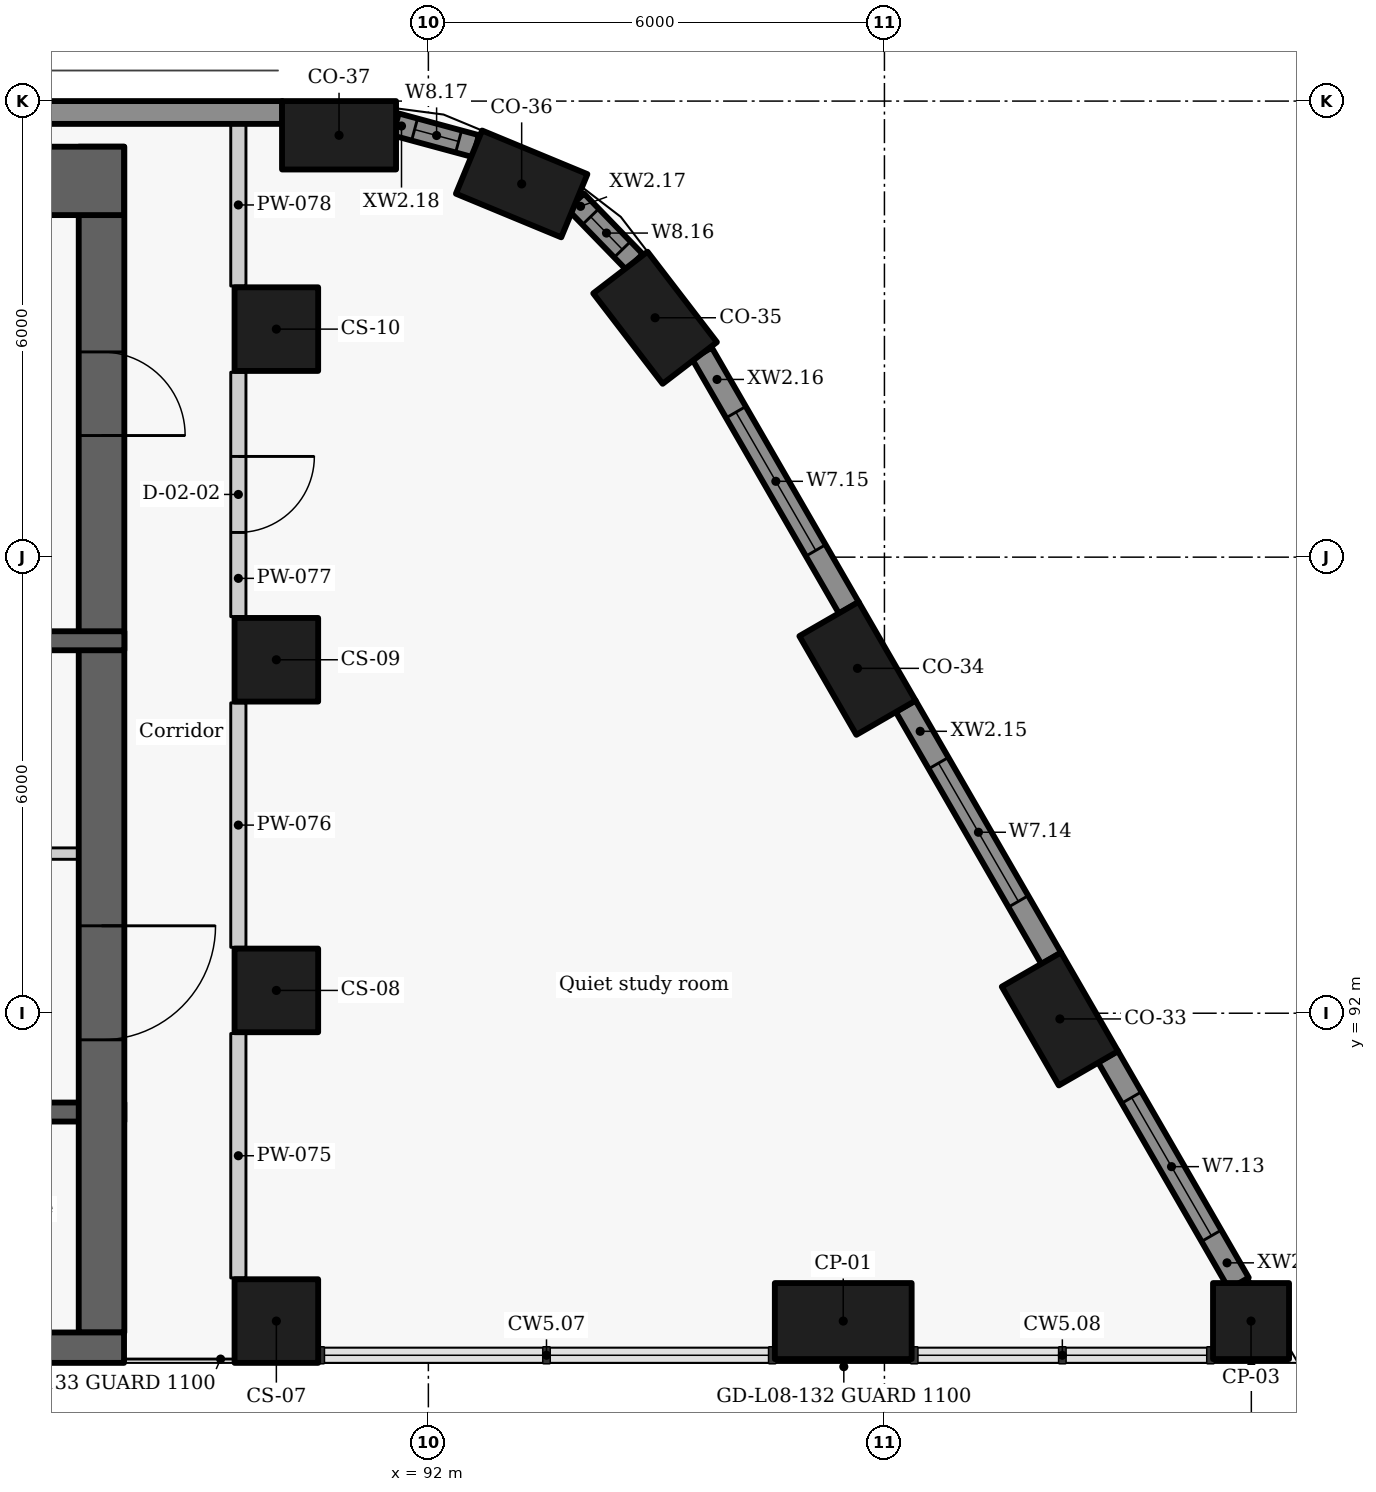
"""IFC4 building model, lengths in metres.
Left out: names, types, materials, properties, quantities, classifications, styles, units other than length and angle.
Written with IfcOpenShell. Run it as: python <this file> out.ifc"""

import sys

from ifc_helpers import new_model, si_unit, direction, frame, frame_2d, origin, origin_2d, place, context, subcontext, project, spatial, rectangle, extrude, element, fill, save


model = new_model("IFC4")
c1 = context("Model", 3, precision=1e-05, world=origin(), true_north=direction((0.0, 1.0)))
c2 = subcontext(c1, "Body", "Model", "MODEL_VIEW")
j1 = project(units=[si_unit("LENGTHUNIT", "METRE"), si_unit("PLANEANGLEUNIT", "RADIAN")], contexts=[c1])
p1 = place(None, origin())
s1 = spatial("IfcSite", under=j1, at=p1, CompositionType="ELEMENT")
p2 = place(p1, origin())
s2 = spatial("IfcBuilding", under=s1, at=p2, CompositionType="ELEMENT")
p3 = place(p2, frame((0.0, 0.0, 34.8)))
s3 = spatial("IfcBuildingStorey", under=s2, at=p3, CompositionType="ELEMENT", Elevation=34.8)
for number, where, z_axis, x_axis in (
    (1, (100.308, 91.925, 0.0), (0.0, 0.0, 1.0), (-0.5, 0.866, 0.0)),
    (2, (97.646, 96.537, 0.0), (0.0, 0.0, 1.0), (-0.5, 0.866, 0.0)),
    (3, (94.982, 101.149, 0.0), (0.0, 0.0, 1.0), (-0.609, 0.793, 0.0)),
    (4, (93.227, 102.91, 0.0), (0.0, 0.0, 1.0), (-0.924, 0.383, 0.0)),
    (5, (90.825, 103.55, 0.0), (0.0, 0.0, 1.0), (-1.0, 0.0, 0.0)),
):
    element("IfcColumn", number, at=place(p3, frame(where, z_axis=z_axis, x_axis=x_axis)), inside=s3, PredefinedType="COLUMN", context=c2, shape_type="SweptSolid", body=[
        extrude(rectangle(XDim=1.5, YDim=0.9, at=origin_2d()), origin(), (0.0, 0.0, 1.0), 3.3),
    ])
for number, where, z_axis, x_axis in (
    (6, (90.0, 87.95, 0.0), (0.0, 0.0, 1.0), (0.0, 1.0, 0.0)),
    (7, (90.0, 92.3, 0.0), (0.0, 0.0, 1.0), (0.0, 1.0, 0.0)),
    (8, (90.0, 96.65, 0.0), (0.0, 0.0, 1.0), (0.0, 1.0, 0.0)),
    (9, (90.0, 101.0, 0.0), (0.0, 0.0, 1.0), (0.0, 1.0, 0.0)),
):
    element("IfcColumn", number, at=place(p3, frame(where, z_axis=z_axis, x_axis=x_axis)), inside=s3, PredefinedType="COLUMN", context=c2, shape_type="SweptSolid", body=[
        extrude(rectangle(XDim=1.1, YDim=1.1, at=origin_2d()), origin(), (0.0, 0.0, 1.0), 3.3),
    ])
p4 = place(p3, frame((97.458, 87.95, 0.0), z_axis=(0.0, 0.0, 1.0), x_axis=(1.0, 0.0, 0.0)))
e10 = element("IfcColumn", 10, at=p4, inside=s3, PredefinedType="COLUMN", context=c2, shape_type="SweptSolid", body=[
    extrude(rectangle(XDim=1.8, YDim=1.0, at=origin_2d()), origin(), (0.0, 0.0, 1.0), 3.3),
])
p5 = place(p3, frame((102.823, 87.95, 0.0), z_axis=(0.0, 0.0, 1.0), x_axis=(1.0, 0.0, 0.0)))
e11 = element("IfcColumn", 11, at=p5, inside=s3, PredefinedType="COLUMN", context=c2, shape_type="SweptSolid", body=[
    extrude(rectangle(XDim=1.0, YDim=1.0, at=origin_2d()), origin(), (0.0, 0.0, 1.0), 3.3),
])
p6 = place(p3, frame((102.663, 88.447, 0.0), z_axis=(0.0, 0.0, 1.0), x_axis=(-0.500035437112, 0.866004943191, 0.0)))
e12 = element("IfcWall", 12, at=p6, inside=s3, PredefinedType="SOLIDWALL", context=c2, shape_type="SweptSolid", body=[
    extrude(rectangle(XDim=3.444, YDim=0.3, at=frame_2d((1.722, 0.0))), origin(), (0.0, 0.0, 1.0), 2.3),
])
p7 = place(p6, frame((0.722, 0.0, 0.9)))
e13 = element("IfcOpeningElement", 13, at=p7, cuts=e12, PredefinedType="OPENING", context=c2, shape_type="SweptSolid", body=[
    extrude(rectangle(XDim=2.1, YDim=1.1, at=frame_2d((1.05, 0.55))), frame((0.0, 0.16, 0.0), z_axis=(0.0, -1.0, 0.0), x_axis=(1.0, 0.0, 0.0)), (0.0, 0.0, 1.0), 0.32),
])
p8 = place(p3, frame((100.195, 92.721, 0.0), z_axis=(0.0, 0.0, 1.0), x_axis=(-0.500001735503, 0.866024401789, 0.0)))
e14 = element("IfcWall", 14, at=p8, inside=s3, PredefinedType="SOLIDWALL", context=c2, shape_type="SweptSolid", body=[
    extrude(rectangle(XDim=3.834, YDim=0.3, at=frame_2d((1.917, 0.0))), origin(), (0.0, 0.0, 1.0), 2.3),
])
p9 = place(p8, frame((0.867, 0.0, 0.9)))
e15 = element("IfcOpeningElement", 15, at=p9, cuts=e14, PredefinedType="OPENING", context=c2, shape_type="SweptSolid", body=[
    extrude(rectangle(XDim=2.1, YDim=1.1, at=frame_2d((1.05, 0.55))), frame((0.0, 0.16, 0.0), z_axis=(0.0, -1.0, 0.0), x_axis=(1.0, 0.0, 0.0)), (0.0, 0.0, 1.0), 0.32),
])
p10 = place(p3, frame((97.532, 97.333, 0.0), z_axis=(0.0, 0.0, 1.0), x_axis=(-0.499948341072, 0.866055227026, 0.0)))
e16 = element("IfcWall", 16, at=p10, inside=s3, PredefinedType="SOLIDWALL", context=c2, shape_type="SweptSolid", body=[
    extrude(rectangle(XDim=3.867, YDim=0.3, at=frame_2d((1.934, 0.0))), origin(), (0.0, 0.0, 1.0), 2.3),
])
p11 = place(p10, frame((0.872, 0.0, 0.9)))
e17 = element("IfcOpeningElement", 17, at=p11, cuts=e16, PredefinedType="OPENING", context=c2, shape_type="SweptSolid", body=[
    extrude(rectangle(XDim=2.1, YDim=1.1, at=frame_2d((1.05, 0.55))), frame((0.0, 0.16, 0.0), z_axis=(0.0, -1.0, 0.0), x_axis=(1.0, 0.0, 0.0)), (0.0, 0.0, 1.0), 0.32),
])
p12 = place(p3, frame((94.713, 101.883, 0.0), z_axis=(0.0, 0.0, 1.0), x_axis=(-0.696138968055, 0.717907053285, 0.0)))
e18 = element("IfcWall", 18, at=p12, inside=s3, PredefinedType="SOLIDWALL", context=c2, shape_type="SweptSolid", body=[
    extrude(rectangle(XDim=1.11, YDim=0.3, at=frame_2d((0.555, 0.0))), origin(), (0.0, 0.0, 1.0), 2.3),
])
p13 = place(p12, frame((0.231, 0.0, 0.9)))
e19 = element("IfcOpeningElement", 19, at=p13, cuts=e18, PredefinedType="OPENING", context=c2, shape_type="SweptSolid", body=[
    extrude(rectangle(XDim=0.6, YDim=1.1, at=frame_2d((0.3, 0.55))), frame((0.0, 0.16, 0.0), z_axis=(0.0, -1.0, 0.0), x_axis=(1.0, 0.0, 0.0)), (0.0, 0.0, 1.0), 0.32),
])
p14 = place(p3, frame((92.625, 103.407, 0.0), z_axis=(0.0, 0.0, 1.0), x_axis=(-0.96522637192, 0.261415475728, 0.0)))
e20 = element("IfcWall", 20, at=p14, inside=s3, PredefinedType="SOLIDWALL", context=c2, shape_type="SweptSolid", body=[
    extrude(rectangle(XDim=1.093, YDim=0.3, at=frame_2d((0.546, 0.0))), origin(), (0.0, 0.0, 1.0), 2.3),
])
p15 = place(p14, frame((0.236, 0.0, 0.9)))
e21 = element("IfcOpeningElement", 21, at=p15, cuts=e20, PredefinedType="OPENING", context=c2, shape_type="SweptSolid", body=[
    extrude(rectangle(XDim=0.6, YDim=1.1, at=frame_2d((0.3, 0.55))), frame((0.0, 0.16, 0.0), z_axis=(0.0, -1.0, 0.0), x_axis=(1.0, 0.0, 0.0)), (0.0, 0.0, 1.0), 0.32),
])
p16 = place(p3, frame((90.079, 103.85, 0.0), z_axis=(0.0, 0.0, 1.0), x_axis=(-1.0, 0.0, 0.0)))
e22 = element("IfcWall", 22, at=p16, inside=s3, PredefinedType="SOLIDWALL", context=c2, shape_type="SweptSolid", body=[
    extrude(rectangle(XDim=20.19, YDim=0.3, at=frame_2d((10.095, 0.0))), origin(), (0.0, 0.0, 1.0), 2.3),
])
p17 = place(p3, frame((88.0, 90.7, -0.275), z_axis=(0.0, 0.0, 1.0), x_axis=(-1.0, 0.0, 0.0)))
e23 = element("IfcWall", 23, at=p17, inside=s3, PredefinedType="SHEAR", context=c2, shape_type="SweptSolid", body=[
    extrude(rectangle(XDim=2.6, YDim=0.25, at=frame_2d((1.3, 0.0))), origin(), (0.0, 0.0, 1.0), 3.175),
])
p18 = place(p17, frame((1.175, 0.0, 0.275)))
e24 = element("IfcOpeningElement", 24, at=p18, cuts=e23, PredefinedType="OPENING", context=c2, shape_type="SweptSolid", body=[
    extrude(rectangle(XDim=0.9, YDim=2.1, at=frame_2d((0.45, 1.05))), frame((0.0, 0.135, 0.0), z_axis=(0.0, -1.0, 0.0), x_axis=(1.0, 0.0, 0.0)), (0.0, 0.0, 1.0), 0.27),
])
p19 = place(p3, frame((87.7, 103.4, -0.275), z_axis=(0.0, 0.0, 1.0), x_axis=(0.0, -1.0, 0.0)))
e25 = element("IfcWall", 25, at=p19, inside=s3, PredefinedType="SHEAR", context=c2, shape_type="SweptSolid", body=[
    extrude(rectangle(XDim=15.6, YDim=0.6, at=frame_2d((7.8, 0.0))), origin(), (0.0, 0.0, 1.0), 3.175),
])
p20 = place(p19, frame((10.25, 0.0, 0.275)))
e26 = element("IfcOpeningElement", 26, at=p20, cuts=e25, PredefinedType="OPENING", context=c2, shape_type="SweptSolid", body=[
    extrude(rectangle(XDim=1.5, YDim=2.1, at=frame_2d((0.75, 1.05))), frame((0.0, 0.31, 0.0), z_axis=(0.0, -1.0, 0.0), x_axis=(1.0, 0.0, 0.0)), (0.0, 0.0, 1.0), 0.62),
])
p21 = place(p19, frame((2.7, 0.0, 0.275)))
e27 = element("IfcOpeningElement", 27, at=p21, cuts=e25, PredefinedType="OPENING", context=c2, shape_type="SweptSolid", body=[
    extrude(rectangle(XDim=1.1, YDim=2.1, at=frame_2d((0.55, 1.05))), frame((0.0, 0.31, 0.0), z_axis=(0.0, -1.0, 0.0), x_axis=(1.0, 0.0, 0.0)), (0.0, 0.0, 1.0), 0.62),
])
p22 = place(p3, frame((85.397, 94.1, 0.0), z_axis=(0.0, 0.0, 1.0), x_axis=(1.0, 0.0, 0.0)))
e28 = element("IfcWall", 28, at=p22, inside=s3, PredefinedType="PARTITIONING", context=c2, shape_type="SweptSolid", body=[
    extrude(rectangle(XDim=2.603, YDim=0.15, at=frame_2d((1.302, 0.0))), origin(), (0.0, 0.0, 1.0), 2.9),
])
p23 = place(p22, frame((0.528, 0.0, 0.0)))
e29 = element("IfcOpeningElement", 29, at=p23, cuts=e28, PredefinedType="OPENING", context=c2, shape_type="SweptSolid", body=[
    extrude(rectangle(XDim=0.9, YDim=2.1, at=frame_2d((0.45, 1.05))), frame((0.0, 0.085, 0.0), z_axis=(0.0, -1.0, 0.0), x_axis=(1.0, 0.0, 0.0)), (0.0, 0.0, 1.0), 0.17),
])
p24 = place(p3, frame((80.0, 96.9, -0.275), z_axis=(0.0, 0.0, 1.0), x_axis=(1.0, 0.0, 0.0)))
e30 = element("IfcWall", 30, at=p24, inside=s3, PredefinedType="SHEAR", context=c2, shape_type="SweptSolid", body=[
    extrude(rectangle(XDim=8.0, YDim=0.25, at=frame_2d((4.0, 0.0))), origin(), (0.0, 0.0, 1.0), 3.175),
])
p25 = place(p24, frame((3.849, 0.0, 0.275)))
e31 = element("IfcOpeningElement", 31, at=p25, cuts=e30, PredefinedType="OPENING", context=c2, shape_type="SweptSolid", body=[
    extrude(rectangle(XDim=1.1, YDim=2.1, at=frame_2d((0.55, 1.05))), frame((0.0, 0.135, 0.0), z_axis=(0.0, -1.0, 0.0), x_axis=(1.0, 0.0, 0.0)), (0.0, 0.0, 1.0), 0.27),
])
p26 = place(p3, frame((89.5, 88.517, 0.0), z_axis=(0.0, 0.0, 1.0), x_axis=(0.0, 1.0, 0.0)))
e32 = element("IfcWall", 32, at=p26, inside=s3, PredefinedType="PARTITIONING", context=c2, shape_type="SweptSolid", body=[
    extrude(rectangle(XDim=3.216, YDim=0.2, at=frame_2d((1.608, 0.0))), origin(), (0.0, 0.0, 1.0), 2.9),
])
p27 = place(p3, frame((89.5, 92.867, 0.0), z_axis=(0.0, 0.0, 1.0), x_axis=(0.0, 1.0, 0.0)))
e33 = element("IfcWall", 33, at=p27, inside=s3, PredefinedType="PARTITIONING", context=c2, shape_type="SweptSolid", body=[
    extrude(rectangle(XDim=3.216, YDim=0.2, at=frame_2d((1.608, 0.0))), origin(), (0.0, 0.0, 1.0), 2.9),
])
p28 = place(p3, frame((89.5, 100.433, 0.0), z_axis=(0.0, 0.0, 1.0), x_axis=(0.0, -1.0, 0.0)))
e34 = element("IfcWall", 34, at=p28, inside=s3, PredefinedType="PARTITIONING", context=c2, shape_type="SweptSolid", body=[
    extrude(rectangle(XDim=3.216, YDim=0.2, at=frame_2d((1.608, 0.0))), origin(), (0.0, 0.0, 1.0), 2.9),
])
p29 = place(p28, frame((1.108, 0.0, 0.0)))
e35 = element("IfcOpeningElement", 35, at=p29, cuts=e34, PredefinedType="OPENING", context=c2, shape_type="SweptSolid", body=[
    extrude(rectangle(XDim=1.0, YDim=2.1, at=frame_2d((0.5, 1.05))), frame((0.0, 0.11, 0.0), z_axis=(0.0, -1.0, 0.0), x_axis=(1.0, 0.0, 0.0)), (0.0, 0.0, 1.0), 0.22),
])
p30 = place(p3, frame((89.5, 101.567, 0.0), z_axis=(0.0, 0.0, 1.0), x_axis=(0.0, 1.0, 0.0)))
e36 = element("IfcWall", 36, at=p30, inside=s3, PredefinedType="PARTITIONING", context=c2, shape_type="SweptSolid", body=[
    extrude(rectangle(XDim=2.133, YDim=0.2, at=frame_2d((1.066, 0.0))), origin(), (0.0, 0.0, 1.0), 2.9),
])
p31 = place(p3, frame((72.004, 87.6, -0.275), z_axis=(0.0, 0.0, 1.0), x_axis=(1.0, 0.0, 0.0)))
e37 = element("IfcWall", 37, at=p31, inside=s3, PredefinedType="SHEAR", context=c2, shape_type="SweptSolid", body=[
    extrude(rectangle(XDim=15.992, YDim=0.4, at=frame_2d((7.996, 0.0))), origin(), (0.0, 0.0, 1.0), 3.175),
])
p32 = place(p3, frame((72.004, 102.95, -0.275), z_axis=(0.0, 0.0, 1.0), x_axis=(1.0, 0.0, 0.0)))
e38 = element("IfcWall", 38, at=p32, inside=s3, PredefinedType="SHEAR", context=c2, shape_type="SweptSolid", body=[
    extrude(rectangle(XDim=15.992, YDim=0.9, at=frame_2d((7.996, 0.0))), origin(), (0.0, 0.0, 1.0), 3.175),
])
p33 = place(p7, origin())
e39 = element("IfcWindow", 39, at=p33, inside=s3, PartitioningType="SINGLE_PANEL", PredefinedType="WINDOW", context=c2, shape_type="SweptSolid", body=[
    extrude(rectangle(XDim=2.1, YDim=1.1, at=frame_2d((1.05, 0.55))), frame((0.0, 0.03, 0.0), z_axis=(0.0, -1.0, 0.0), x_axis=(1.0, 0.0, 0.0)), (0.0, 0.0, 1.0), 0.06),
])
fill(e13, e39)
p34 = place(p9, origin())
e40 = element("IfcWindow", 40, at=p34, inside=s3, PartitioningType="SINGLE_PANEL", PredefinedType="WINDOW", context=c2, shape_type="SweptSolid", body=[
    extrude(rectangle(XDim=2.1, YDim=1.1, at=frame_2d((1.05, 0.55))), frame((0.0, 0.03, 0.0), z_axis=(0.0, -1.0, 0.0), x_axis=(1.0, 0.0, 0.0)), (0.0, 0.0, 1.0), 0.06),
])
fill(e15, e40)
p35 = place(p11, origin())
e41 = element("IfcWindow", 41, at=p35, inside=s3, PartitioningType="SINGLE_PANEL", PredefinedType="WINDOW", context=c2, shape_type="SweptSolid", body=[
    extrude(rectangle(XDim=2.1, YDim=1.1, at=frame_2d((1.05, 0.55))), frame((0.0, 0.03, 0.0), z_axis=(0.0, -1.0, 0.0), x_axis=(1.0, 0.0, 0.0)), (0.0, 0.0, 1.0), 0.06),
])
fill(e17, e41)
p36 = place(p13, origin())
e42 = element("IfcWindow", 42, at=p36, inside=s3, PartitioningType="SINGLE_PANEL", PredefinedType="WINDOW", context=c2, shape_type="SweptSolid", body=[
    extrude(rectangle(XDim=0.6, YDim=1.1, at=frame_2d((0.3, 0.55))), frame((0.0, 0.03, 0.0), z_axis=(0.0, -1.0, 0.0), x_axis=(1.0, 0.0, 0.0)), (0.0, 0.0, 1.0), 0.06),
])
fill(e19, e42)
p37 = place(p15, origin())
e43 = element("IfcWindow", 43, at=p37, inside=s3, PartitioningType="SINGLE_PANEL", PredefinedType="WINDOW", context=c2, shape_type="SweptSolid", body=[
    extrude(rectangle(XDim=0.6, YDim=1.1, at=frame_2d((0.3, 0.55))), frame((0.0, 0.03, 0.0), z_axis=(0.0, -1.0, 0.0), x_axis=(1.0, 0.0, 0.0)), (0.0, 0.0, 1.0), 0.06),
])
fill(e21, e43)
p38 = place(p29, origin())
e44 = element("IfcDoor", 44, at=p38, inside=s3, OperationType="SINGLE_SWING_LEFT", PredefinedType="DOOR", context=c2, shape_type="SweptSolid", body=[
    extrude(rectangle(XDim=1.0, YDim=2.1, at=frame_2d((0.5, 1.05))), frame((0.0, 0.025, 0.0), z_axis=(0.0, -1.0, 0.0), x_axis=(1.0, 0.0, 0.0)), (0.0, 0.0, 1.0), 0.05),
])
fill(e35, e44)
p39 = place(p20, origin())
e45 = element("IfcDoor", 45, at=p39, inside=s3, OperationType="DOUBLE_DOOR_SINGLE_SWING", PredefinedType="DOOR", context=c2, shape_type="SweptSolid", body=[
    extrude(rectangle(XDim=1.5, YDim=2.1, at=frame_2d((0.75, 1.05))), frame((0.0, 0.025, 0.0), z_axis=(0.0, -1.0, 0.0), x_axis=(1.0, 0.0, 0.0)), (0.0, 0.0, 1.0), 0.05),
])
fill(e26, e45)
p40 = place(p21, origin())
e46 = element("IfcDoor", 46, at=p40, inside=s3, OperationType="SINGLE_SWING_RIGHT", PredefinedType="DOOR", context=c2, shape_type="SweptSolid", body=[
    extrude(rectangle(XDim=1.1, YDim=2.1, at=frame_2d((0.55, 1.05))), frame((0.0, 0.025, 0.0), z_axis=(0.0, -1.0, 0.0), x_axis=(1.0, 0.0, 0.0)), (0.0, 0.0, 1.0), 0.05),
])
fill(e27, e46)
save(model, sys.argv[1])
